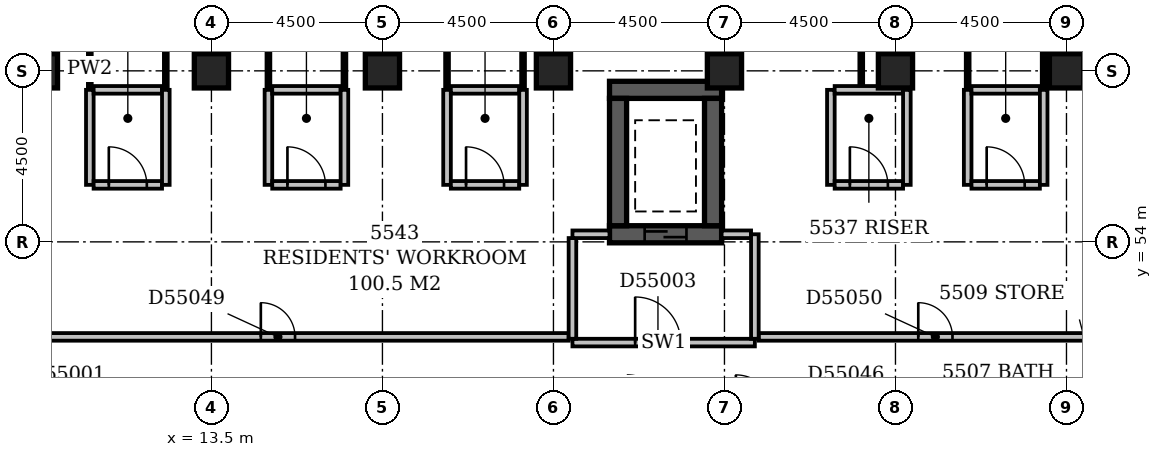
"""IFC4 building model, lengths in metres.
Left out: names, types, materials, properties, quantities, classifications, styles, units other than length and angle.
Written with IfcOpenShell. Run it as: python <this file> out.ifc"""

import sys

from ifc_helpers import new_model, si_unit, direction, frame, frame_2d, origin, origin_2d, place, context, subcontext, project, spatial, rectangle, extrude, element, fill, save


model = new_model("IFC4")
c1 = context("Model", 3, precision=1e-05, world=origin(), true_north=direction((0.0, 1.0)))
c2 = subcontext(c1, "Body", "Model", "MODEL_VIEW")
j1 = project(units=[si_unit("LENGTHUNIT", "METRE"), si_unit("PLANEANGLEUNIT", "RADIAN")], contexts=[c1])
p1 = place(None, origin())
s1 = spatial("IfcSite", under=j1, at=p1, CompositionType="ELEMENT")
p2 = place(p1, origin())
s2 = spatial("IfcBuilding", under=s1, at=p2, CompositionType="ELEMENT")
p3 = place(p2, frame((0.0, 0.0, 215.0)))
s3 = spatial("IfcBuildingStorey", under=s2, at=p3, CompositionType="ELEMENT", Elevation=215.0)
p4 = place(p3, frame((23.975, 54.2, -0.3), z_axis=(0.0, 0.0, 1.0), x_axis=(1.0, 0.0, 0.0)))
e1 = element("IfcWall", 1, at=p4, inside=s3, PredefinedType="SHEAR", context=c2, shape_type="SweptSolid", body=[
    extrude(rectangle(XDim=2.95, YDim=0.45, at=frame_2d((1.475, 0.0))), origin(), (0.0, 0.0, 1.0), 3.6),
])
p5 = place(p4, frame((0.925, 0.0, 0.3)))
e2 = element("IfcOpeningElement", 2, at=p5, cuts=e1, PredefinedType="OPENING", context=c2, shape_type="SweptSolid", body=[
    extrude(rectangle(XDim=1.1, YDim=2.1, at=frame_2d((0.55, 1.05))), frame((0.0, 0.237, 0.0), z_axis=(0.0, -1.0, 0.0), x_axis=(1.0, 0.0, 0.0)), (0.0, 0.0, 1.0), 0.474),
])
p6 = place(p3, frame((23.975, 58.0, -0.3), z_axis=(0.0, 0.0, 1.0), x_axis=(1.0, 0.0, 0.0)))
e3 = element("IfcWall", 3, at=p6, inside=s3, PredefinedType="SHEAR", context=c2, shape_type="SweptSolid", body=[
    extrude(rectangle(XDim=2.95, YDim=0.45, at=frame_2d((1.475, 0.0))), origin(), (0.0, 0.0, 1.0), 3.6),
])
for number, where, z_axis, x_axis in (
    (4, (24.2, 54.425, -0.3), (0.0, 0.0, 1.0), (0.0, 1.0, 0.0)),
    (5, (26.7, 54.425, -0.3), (0.0, 0.0, 1.0), (0.0, 1.0, 0.0)),
):
    element("IfcWall", number, at=place(p3, frame(where, z_axis=z_axis, x_axis=x_axis)), inside=s3, PredefinedType="SHEAR", context=c2, shape_type="SweptSolid", body=[
        extrude(rectangle(XDim=3.35, YDim=0.45, at=frame_2d((1.675, 0.0))), origin(), (0.0, 0.0, 1.0), 3.6),
    ])
for number, where, z_axis, x_axis in (
    (6, (9.0, 58.5, -0.3), (0.0, 0.0, 1.0), (1.0, 0.0, 0.0)),
    (7, (13.5, 58.5, -0.3), (0.0, 0.0, 1.0), (1.0, 0.0, 0.0)),
    (8, (18.0, 58.5, -0.3), (0.0, 0.0, 1.0), (1.0, 0.0, 0.0)),
    (9, (22.5, 58.5, -0.3), (0.0, 0.0, 1.0), (1.0, 0.0, 0.0)),
    (10, (27.0, 58.5, -0.3), (0.0, 0.0, 1.0), (1.0, 0.0, 0.0)),
    (11, (31.5, 58.5, -0.3), (0.0, 0.0, 1.0), (1.0, 0.0, 0.0)),
    (12, (36.0, 58.5, -0.3), (0.0, 0.0, 1.0), (1.0, 0.0, 0.0)),
):
    element("IfcColumn", number, at=place(p3, frame(where, z_axis=z_axis, x_axis=x_axis)), inside=s3, PredefinedType="COLUMN", context=c2, shape_type="SweptSolid", body=[
        extrude(rectangle(XDim=0.9, YDim=0.9, at=origin_2d()), origin(), (0.0, 0.0, 1.0), 3.6),
    ])
p7 = place(p3, frame((23.0, 51.35, 0.0), z_axis=(0.0, 0.0, 1.0), x_axis=(1.0, 0.0, 0.0)))
e13 = element("IfcWall", 13, at=p7, inside=s3, PredefinedType="PARTITIONING", context=c2, shape_type="SweptSolid", body=[
    extrude(rectangle(XDim=4.8, YDim=0.2, at=frame_2d((2.4, 0.0))), origin(), (0.0, 0.0, 1.0), 3.3),
])
p8 = place(p7, frame((1.65, 0.0, 0.0)))
e14 = element("IfcOpeningElement", 14, at=p8, cuts=e13, PredefinedType="OPENING", context=c2, shape_type="SweptSolid", body=[
    extrude(rectangle(XDim=1.2, YDim=2.1, at=frame_2d((0.6, 1.05))), frame((0.0, 0.112, 0.0), z_axis=(0.0, -1.0, 0.0), x_axis=(1.0, 0.0, 0.0)), (0.0, 0.0, 1.0), 0.224),
])
p9 = place(p3, frame((27.8, 51.45, 0.0), z_axis=(0.0, 0.0, 1.0), x_axis=(0.0, 1.0, 0.0)))
e15 = element("IfcWall", 15, at=p9, inside=s3, PredefinedType="PARTITIONING", context=c2, shape_type="SweptSolid", body=[
    extrude(rectangle(XDim=2.75, YDim=0.2, at=frame_2d((1.375, 0.0))), origin(), (0.0, 0.0, 1.0), 3.3),
])
p10 = place(p3, frame((23.0, 54.2, 0.0), z_axis=(0.0, 0.0, 1.0), x_axis=(1.0, 0.0, 0.0)))
e16 = element("IfcWall", 16, at=p10, inside=s3, PredefinedType="PARTITIONING", context=c2, shape_type="SweptSolid", body=[
    extrude(rectangle(XDim=0.975, YDim=0.2, at=frame_2d((0.488, 0.0))), origin(), (0.0, 0.0, 1.0), 3.3),
])
p11 = place(p3, frame((26.925, 54.2, 0.0), z_axis=(0.0, 0.0, 1.0), x_axis=(1.0, 0.0, 0.0)))
e17 = element("IfcWall", 17, at=p11, inside=s3, PredefinedType="PARTITIONING", context=c2, shape_type="SweptSolid", body=[
    extrude(rectangle(XDim=0.775, YDim=0.2, at=frame_2d((0.387, 0.0))), origin(), (0.0, 0.0, 1.0), 3.3),
])
p12 = place(p3, frame((23.0, 51.45, 0.0), z_axis=(0.0, 0.0, 1.0), x_axis=(0.0, 1.0, 0.0)))
e18 = element("IfcWall", 18, at=p12, inside=s3, PredefinedType="PARTITIONING", context=c2, shape_type="SweptSolid", body=[
    extrude(rectangle(XDim=2.65, YDim=0.2, at=frame_2d((1.325, 0.0))), origin(), (0.0, 0.0, 1.0), 3.3),
])
p13 = place(p3, frame((7.6, 51.5, 0.0), z_axis=(0.0, 0.0, 1.0), x_axis=(1.0, 0.0, 0.0)))
e19 = element("IfcWall", 19, at=p13, inside=s3, PredefinedType="PARTITIONING", context=c2, shape_type="SweptSolid", body=[
    extrude(rectangle(XDim=15.3, YDim=0.2, at=frame_2d((7.65, 0.0))), origin(), (0.0, 0.0, 1.0), 3.3),
])
p14 = place(p13, frame((7.2, 0.0, 0.0)))
e20 = element("IfcOpeningElement", 20, at=p14, cuts=e19, PredefinedType="OPENING", context=c2, shape_type="SweptSolid", body=[
    extrude(rectangle(XDim=0.9, YDim=2.1, at=frame_2d((0.45, 1.05))), frame((0.0, 0.112, 0.0), z_axis=(0.0, -1.0, 0.0), x_axis=(1.0, 0.0, 0.0)), (0.0, 0.0, 1.0), 0.224),
])
p15 = place(p3, frame((27.9, 51.5, 0.0), z_axis=(0.0, 0.0, 1.0), x_axis=(1.0, 0.0, 0.0)))
e21 = element("IfcWall", 21, at=p15, inside=s3, PredefinedType="PARTITIONING", context=c2, shape_type="SweptSolid", body=[
    extrude(rectangle(XDim=9.3, YDim=0.2, at=frame_2d((4.65, 0.0))), origin(), (0.0, 0.0, 1.0), 3.3),
])
p16 = place(p15, frame((4.2, 0.0, 0.0)))
e22 = element("IfcOpeningElement", 22, at=p16, cuts=e21, PredefinedType="OPENING", context=c2, shape_type="SweptSolid", body=[
    extrude(rectangle(XDim=0.9, YDim=2.1, at=frame_2d((0.45, 1.05))), frame((0.0, 0.112, 0.0), z_axis=(0.0, -1.0, 0.0), x_axis=(1.0, 0.0, 0.0)), (0.0, 0.0, 1.0), 0.224),
])
p17 = place(p3, frame((10.3, 55.5, 0.0), z_axis=(0.0, 0.0, 1.0), x_axis=(0.0, 1.0, 0.0)))
e23 = element("IfcWall", 23, at=p17, inside=s3, PredefinedType="PARTITIONING", context=c2, shape_type="SweptSolid", body=[
    extrude(rectangle(XDim=2.5, YDim=0.2, at=frame_2d((1.25, 0.0))), origin(), (0.0, 0.0, 1.0), 3.3),
])
p18 = place(p3, frame((10.4, 55.5, 0.0), z_axis=(0.0, 0.0, 1.0), x_axis=(1.0, 0.0, 0.0)))
e24 = element("IfcWall", 24, at=p18, inside=s3, PredefinedType="PARTITIONING", context=c2, shape_type="SweptSolid", body=[
    extrude(rectangle(XDim=1.8, YDim=0.2, at=frame_2d((0.9, 0.0))), origin(), (0.0, 0.0, 1.0), 3.3),
])
p19 = place(p18, frame((0.4, 0.0, 0.0)))
e25 = element("IfcOpeningElement", 25, at=p19, cuts=e24, PredefinedType="OPENING", context=c2, shape_type="SweptSolid", body=[
    extrude(rectangle(XDim=1.0, YDim=2.1, at=frame_2d((0.5, 1.05))), frame((0.0, 0.112, 0.0), z_axis=(0.0, -1.0, 0.0), x_axis=(1.0, 0.0, 0.0)), (0.0, 0.0, 1.0), 0.224),
])
for number, where, z_axis, x_axis in (
    (26, (12.3, 55.5, 0.0), (0.0, 0.0, 1.0), (0.0, 1.0, 0.0)),
    (27, (15.0, 55.5, 0.0), (0.0, 0.0, 1.0), (0.0, 1.0, 0.0)),
):
    element("IfcWall", number, at=place(p3, frame(where, z_axis=z_axis, x_axis=x_axis)), inside=s3, PredefinedType="PARTITIONING", context=c2, shape_type="SweptSolid", body=[
        extrude(rectangle(XDim=2.5, YDim=0.2, at=frame_2d((1.25, 0.0))), origin(), (0.0, 0.0, 1.0), 3.3),
    ])
p20 = place(p3, frame((15.1, 55.5, 0.0), z_axis=(0.0, 0.0, 1.0), x_axis=(1.0, 0.0, 0.0)))
e28 = element("IfcWall", 28, at=p20, inside=s3, PredefinedType="PARTITIONING", context=c2, shape_type="SweptSolid", body=[
    extrude(rectangle(XDim=1.8, YDim=0.2, at=frame_2d((0.9, 0.0))), origin(), (0.0, 0.0, 1.0), 3.3),
])
p21 = place(p20, frame((0.4, 0.0, 0.0)))
e29 = element("IfcOpeningElement", 29, at=p21, cuts=e28, PredefinedType="OPENING", context=c2, shape_type="SweptSolid", body=[
    extrude(rectangle(XDim=1.0, YDim=2.1, at=frame_2d((0.5, 1.05))), frame((0.0, 0.112, 0.0), z_axis=(0.0, -1.0, 0.0), x_axis=(1.0, 0.0, 0.0)), (0.0, 0.0, 1.0), 0.224),
])
for number, where, z_axis, x_axis in (
    (30, (17.0, 55.5, 0.0), (0.0, 0.0, 1.0), (0.0, 1.0, 0.0)),
    (31, (19.7, 55.5, 0.0), (0.0, 0.0, 1.0), (0.0, 1.0, 0.0)),
):
    element("IfcWall", number, at=place(p3, frame(where, z_axis=z_axis, x_axis=x_axis)), inside=s3, PredefinedType="PARTITIONING", context=c2, shape_type="SweptSolid", body=[
        extrude(rectangle(XDim=2.5, YDim=0.2, at=frame_2d((1.25, 0.0))), origin(), (0.0, 0.0, 1.0), 3.3),
    ])
p22 = place(p3, frame((19.8, 55.5, 0.0), z_axis=(0.0, 0.0, 1.0), x_axis=(1.0, 0.0, 0.0)))
e32 = element("IfcWall", 32, at=p22, inside=s3, PredefinedType="PARTITIONING", context=c2, shape_type="SweptSolid", body=[
    extrude(rectangle(XDim=1.8, YDim=0.2, at=frame_2d((0.9, 0.0))), origin(), (0.0, 0.0, 1.0), 3.3),
])
p23 = place(p22, frame((0.4, 0.0, 0.0)))
e33 = element("IfcOpeningElement", 33, at=p23, cuts=e32, PredefinedType="OPENING", context=c2, shape_type="SweptSolid", body=[
    extrude(rectangle(XDim=1.0, YDim=2.1, at=frame_2d((0.5, 1.05))), frame((0.0, 0.112, 0.0), z_axis=(0.0, -1.0, 0.0), x_axis=(1.0, 0.0, 0.0)), (0.0, 0.0, 1.0), 0.224),
])
for number, where, z_axis, x_axis in (
    (34, (21.7, 55.5, 0.0), (0.0, 0.0, 1.0), (0.0, 1.0, 0.0)),
    (35, (29.8, 55.5, 0.0), (0.0, 0.0, 1.0), (0.0, 1.0, 0.0)),
):
    element("IfcWall", number, at=place(p3, frame(where, z_axis=z_axis, x_axis=x_axis)), inside=s3, PredefinedType="PARTITIONING", context=c2, shape_type="SweptSolid", body=[
        extrude(rectangle(XDim=2.5, YDim=0.2, at=frame_2d((1.25, 0.0))), origin(), (0.0, 0.0, 1.0), 3.3),
    ])
p24 = place(p3, frame((29.9, 55.5, 0.0), z_axis=(0.0, 0.0, 1.0), x_axis=(1.0, 0.0, 0.0)))
e36 = element("IfcWall", 36, at=p24, inside=s3, PredefinedType="PARTITIONING", context=c2, shape_type="SweptSolid", body=[
    extrude(rectangle(XDim=1.8, YDim=0.2, at=frame_2d((0.9, 0.0))), origin(), (0.0, 0.0, 1.0), 3.3),
])
p25 = place(p24, frame((0.4, 0.0, 0.0)))
e37 = element("IfcOpeningElement", 37, at=p25, cuts=e36, PredefinedType="OPENING", context=c2, shape_type="SweptSolid", body=[
    extrude(rectangle(XDim=1.0, YDim=2.1, at=frame_2d((0.5, 1.05))), frame((0.0, 0.112, 0.0), z_axis=(0.0, -1.0, 0.0), x_axis=(1.0, 0.0, 0.0)), (0.0, 0.0, 1.0), 0.224),
])
for number, where, z_axis, x_axis in (
    (38, (31.8, 55.5, 0.0), (0.0, 0.0, 1.0), (0.0, 1.0, 0.0)),
    (39, (33.4, 55.5, 0.0), (0.0, 0.0, 1.0), (0.0, 1.0, 0.0)),
):
    element("IfcWall", number, at=place(p3, frame(where, z_axis=z_axis, x_axis=x_axis)), inside=s3, PredefinedType="PARTITIONING", context=c2, shape_type="SweptSolid", body=[
        extrude(rectangle(XDim=2.5, YDim=0.2, at=frame_2d((1.25, 0.0))), origin(), (0.0, 0.0, 1.0), 3.3),
    ])
p26 = place(p3, frame((33.5, 55.5, 0.0), z_axis=(0.0, 0.0, 1.0), x_axis=(1.0, 0.0, 0.0)))
e40 = element("IfcWall", 40, at=p26, inside=s3, PredefinedType="PARTITIONING", context=c2, shape_type="SweptSolid", body=[
    extrude(rectangle(XDim=1.8, YDim=0.2, at=frame_2d((0.9, 0.0))), origin(), (0.0, 0.0, 1.0), 3.3),
])
p27 = place(p26, frame((0.4, 0.0, 0.0)))
e41 = element("IfcOpeningElement", 41, at=p27, cuts=e40, PredefinedType="OPENING", context=c2, shape_type="SweptSolid", body=[
    extrude(rectangle(XDim=1.0, YDim=2.1, at=frame_2d((0.5, 1.05))), frame((0.0, 0.112, 0.0), z_axis=(0.0, -1.0, 0.0), x_axis=(1.0, 0.0, 0.0)), (0.0, 0.0, 1.0), 0.224),
])
p28 = place(p3, frame((35.4, 55.5, 0.0), z_axis=(0.0, 0.0, 1.0), x_axis=(0.0, 1.0, 0.0)))
e42 = element("IfcWall", 42, at=p28, inside=s3, PredefinedType="PARTITIONING", context=c2, shape_type="SweptSolid", body=[
    extrude(rectangle(XDim=2.5, YDim=0.2, at=frame_2d((1.25, 0.0))), origin(), (0.0, 0.0, 1.0), 2.4),
])
p29 = place(p3, frame((10.3, 58.0, 0.0), z_axis=(0.0, 0.0, 1.0), x_axis=(0.0, 1.0, 0.0)))
e43 = element("IfcWall", 43, at=p29, inside=s3, PredefinedType="PARTITIONING", context=c2, shape_type="SweptSolid", body=[
    extrude(rectangle(XDim=1.1, YDim=0.1, at=frame_2d((0.55, 0.0))), origin(), (0.0, 0.0, 1.0), 3.3),
])
p30 = place(p3, frame((10.4, 58.0, 0.0), z_axis=(0.0, 0.0, 1.0), x_axis=(1.0, 0.0, 0.0)))
e44 = element("IfcWall", 44, at=p30, inside=s3, PredefinedType="PARTITIONING", context=c2, shape_type="SweptSolid", body=[
    extrude(rectangle(XDim=1.8, YDim=0.2, at=frame_2d((0.9, 0.0))), origin(), (0.0, 0.0, 1.0), 3.3),
])
for number, where, z_axis, x_axis in (
    (45, (12.3, 58.0, 0.0), (0.0, 0.0, 1.0), (0.0, 1.0, 0.0)),
    (46, (15.0, 58.0, 0.0), (0.0, 0.0, 1.0), (0.0, 1.0, 0.0)),
):
    element("IfcWall", number, at=place(p3, frame(where, z_axis=z_axis, x_axis=x_axis)), inside=s3, PredefinedType="PARTITIONING", context=c2, shape_type="SweptSolid", body=[
        extrude(rectangle(XDim=1.1, YDim=0.1, at=frame_2d((0.55, 0.0))), origin(), (0.0, 0.0, 1.0), 3.3),
    ])
p31 = place(p3, frame((15.1, 58.0, 0.0), z_axis=(0.0, 0.0, 1.0), x_axis=(1.0, 0.0, 0.0)))
e47 = element("IfcWall", 47, at=p31, inside=s3, PredefinedType="PARTITIONING", context=c2, shape_type="SweptSolid", body=[
    extrude(rectangle(XDim=1.8, YDim=0.2, at=frame_2d((0.9, 0.0))), origin(), (0.0, 0.0, 1.0), 3.3),
])
for number, where, z_axis, x_axis in (
    (48, (17.0, 58.0, 0.0), (0.0, 0.0, 1.0), (0.0, 1.0, 0.0)),
    (49, (19.7, 58.0, 0.0), (0.0, 0.0, 1.0), (0.0, 1.0, 0.0)),
):
    element("IfcWall", number, at=place(p3, frame(where, z_axis=z_axis, x_axis=x_axis)), inside=s3, PredefinedType="PARTITIONING", context=c2, shape_type="SweptSolid", body=[
        extrude(rectangle(XDim=1.1, YDim=0.1, at=frame_2d((0.55, 0.0))), origin(), (0.0, 0.0, 1.0), 3.3),
    ])
p32 = place(p3, frame((19.8, 58.0, 0.0), z_axis=(0.0, 0.0, 1.0), x_axis=(1.0, 0.0, 0.0)))
e50 = element("IfcWall", 50, at=p32, inside=s3, PredefinedType="PARTITIONING", context=c2, shape_type="SweptSolid", body=[
    extrude(rectangle(XDim=1.8, YDim=0.2, at=frame_2d((0.9, 0.0))), origin(), (0.0, 0.0, 1.0), 3.3),
])
p33 = place(p3, frame((21.7, 58.0, 0.0), z_axis=(0.0, 0.0, 1.0), x_axis=(0.0, 1.0, 0.0)))
e51 = element("IfcWall", 51, at=p33, inside=s3, PredefinedType="PARTITIONING", context=c2, shape_type="SweptSolid", body=[
    extrude(rectangle(XDim=1.1, YDim=0.1, at=frame_2d((0.55, 0.0))), origin(), (0.0, 0.0, 1.0), 3.3),
])
p34 = place(p3, frame((29.9, 58.0, 0.0), z_axis=(0.0, 0.0, 1.0), x_axis=(1.0, 0.0, 0.0)))
e52 = element("IfcWall", 52, at=p34, inside=s3, PredefinedType="PARTITIONING", context=c2, shape_type="SweptSolid", body=[
    extrude(rectangle(XDim=1.8, YDim=0.2, at=frame_2d((0.9, 0.0))), origin(), (0.0, 0.0, 1.0), 3.3),
])
p35 = place(p3, frame((33.4, 58.0, 0.0), z_axis=(0.0, 0.0, 1.0), x_axis=(0.0, 1.0, 0.0)))
e53 = element("IfcWall", 53, at=p35, inside=s3, PredefinedType="PARTITIONING", context=c2, shape_type="SweptSolid", body=[
    extrude(rectangle(XDim=1.1, YDim=0.1, at=frame_2d((0.55, 0.0))), origin(), (0.0, 0.0, 1.0), 3.3),
])
p36 = place(p3, frame((33.5, 58.0, 0.0), z_axis=(0.0, 0.0, 1.0), x_axis=(1.0, 0.0, 0.0)))
e54 = element("IfcWall", 54, at=p36, inside=s3, PredefinedType="PARTITIONING", context=c2, shape_type="SweptSolid", body=[
    extrude(rectangle(XDim=1.8, YDim=0.2, at=frame_2d((0.9, 0.0))), origin(), (0.0, 0.0, 1.0), 3.3),
])
p37 = place(p3, frame((35.4, 58.0, 0.0), z_axis=(0.0, 0.0, 1.0), x_axis=(0.0, 1.0, 0.0)))
e55 = element("IfcWall", 55, at=p37, inside=s3, PredefinedType="PARTITIONING", context=c2, shape_type="SweptSolid", body=[
    extrude(rectangle(XDim=1.1, YDim=0.1, at=frame_2d((0.55, 0.0))), origin(), (0.0, 0.0, 1.0), 2.4),
])
p38 = place(p3, frame((30.6, 58.1, 0.0), z_axis=(0.0, 0.0, 1.0), x_axis=(0.0, 1.0, 0.0)))
e56 = element("IfcWall", 56, at=p38, inside=s3, PredefinedType="PARTITIONING", context=c2, shape_type="SweptSolid", body=[
    extrude(rectangle(XDim=1.0, YDim=0.1, at=frame_2d((0.5, 0.0))), origin(), (0.0, 0.0, 1.0), 3.3),
])
p39 = place(p8, origin())
e57 = element("IfcDoor", 57, at=p39, inside=s3, OperationType="SINGLE_SWING_LEFT", PredefinedType="DOOR", context=c2, shape_type="SweptSolid", body=[
    extrude(rectangle(XDim=1.2, YDim=2.1, at=frame_2d((0.6, 1.05))), frame((0.0, 0.025, 0.0), z_axis=(0.0, -1.0, 0.0), x_axis=(1.0, 0.0, 0.0)), (0.0, 0.0, 1.0), 0.05),
])
fill(e14, e57)
p40 = place(p5, origin())
e58 = element("IfcDoor", 58, at=p40, inside=s3, OperationType="SLIDING_TO_LEFT", PredefinedType="DOOR", context=c2, shape_type="SweptSolid", body=[
    extrude(rectangle(XDim=1.1, YDim=2.1, at=frame_2d((0.55, 1.05))), frame((0.0, 0.025, 0.0), z_axis=(0.0, -1.0, 0.0), x_axis=(1.0, 0.0, 0.0)), (0.0, 0.0, 1.0), 0.05),
])
fill(e2, e58)
p41 = place(p14, origin())
e59 = element("IfcDoor", 59, at=p41, inside=s3, OperationType="SINGLE_SWING_LEFT", PredefinedType="DOOR", context=c2, shape_type="SweptSolid", body=[
    extrude(rectangle(XDim=0.9, YDim=2.1, at=frame_2d((0.45, 1.05))), frame((0.0, 0.025, 0.0), z_axis=(0.0, -1.0, 0.0), x_axis=(1.0, 0.0, 0.0)), (0.0, 0.0, 1.0), 0.05),
])
fill(e20, e59)
p42 = place(p16, origin())
e60 = element("IfcDoor", 60, at=p42, inside=s3, OperationType="SINGLE_SWING_LEFT", PredefinedType="DOOR", context=c2, shape_type="SweptSolid", body=[
    extrude(rectangle(XDim=0.9, YDim=2.1, at=frame_2d((0.45, 1.05))), frame((0.0, 0.025, 0.0), z_axis=(0.0, -1.0, 0.0), x_axis=(1.0, 0.0, 0.0)), (0.0, 0.0, 1.0), 0.05),
])
fill(e22, e60)
p43 = place(p19, origin())
e61 = element("IfcDoor", 61, at=p43, inside=s3, OperationType="SINGLE_SWING_LEFT", PredefinedType="DOOR", context=c2, shape_type="SweptSolid", body=[
    extrude(rectangle(XDim=1.0, YDim=2.1, at=frame_2d((0.5, 1.05))), frame((0.0, 0.025, 0.0), z_axis=(0.0, -1.0, 0.0), x_axis=(1.0, 0.0, 0.0)), (0.0, 0.0, 1.0), 0.05),
])
fill(e25, e61)
p44 = place(p21, origin())
e62 = element("IfcDoor", 62, at=p44, inside=s3, OperationType="SINGLE_SWING_LEFT", PredefinedType="DOOR", context=c2, shape_type="SweptSolid", body=[
    extrude(rectangle(XDim=1.0, YDim=2.1, at=frame_2d((0.5, 1.05))), frame((0.0, 0.025, 0.0), z_axis=(0.0, -1.0, 0.0), x_axis=(1.0, 0.0, 0.0)), (0.0, 0.0, 1.0), 0.05),
])
fill(e29, e62)
p45 = place(p23, origin())
e63 = element("IfcDoor", 63, at=p45, inside=s3, OperationType="SINGLE_SWING_LEFT", PredefinedType="DOOR", context=c2, shape_type="SweptSolid", body=[
    extrude(rectangle(XDim=1.0, YDim=2.1, at=frame_2d((0.5, 1.05))), frame((0.0, 0.025, 0.0), z_axis=(0.0, -1.0, 0.0), x_axis=(1.0, 0.0, 0.0)), (0.0, 0.0, 1.0), 0.05),
])
fill(e33, e63)
p46 = place(p25, origin())
e64 = element("IfcDoor", 64, at=p46, inside=s3, OperationType="SINGLE_SWING_LEFT", PredefinedType="DOOR", context=c2, shape_type="SweptSolid", body=[
    extrude(rectangle(XDim=1.0, YDim=2.1, at=frame_2d((0.5, 1.05))), frame((0.0, 0.025, 0.0), z_axis=(0.0, -1.0, 0.0), x_axis=(1.0, 0.0, 0.0)), (0.0, 0.0, 1.0), 0.05),
])
fill(e37, e64)
p47 = place(p27, origin())
e65 = element("IfcDoor", 65, at=p47, inside=s3, OperationType="SINGLE_SWING_LEFT", PredefinedType="DOOR", context=c2, shape_type="SweptSolid", body=[
    extrude(rectangle(XDim=1.0, YDim=2.1, at=frame_2d((0.5, 1.05))), frame((0.0, 0.025, 0.0), z_axis=(0.0, -1.0, 0.0), x_axis=(1.0, 0.0, 0.0)), (0.0, 0.0, 1.0), 0.05),
])
fill(e41, e65)
save(model, sys.argv[1])
